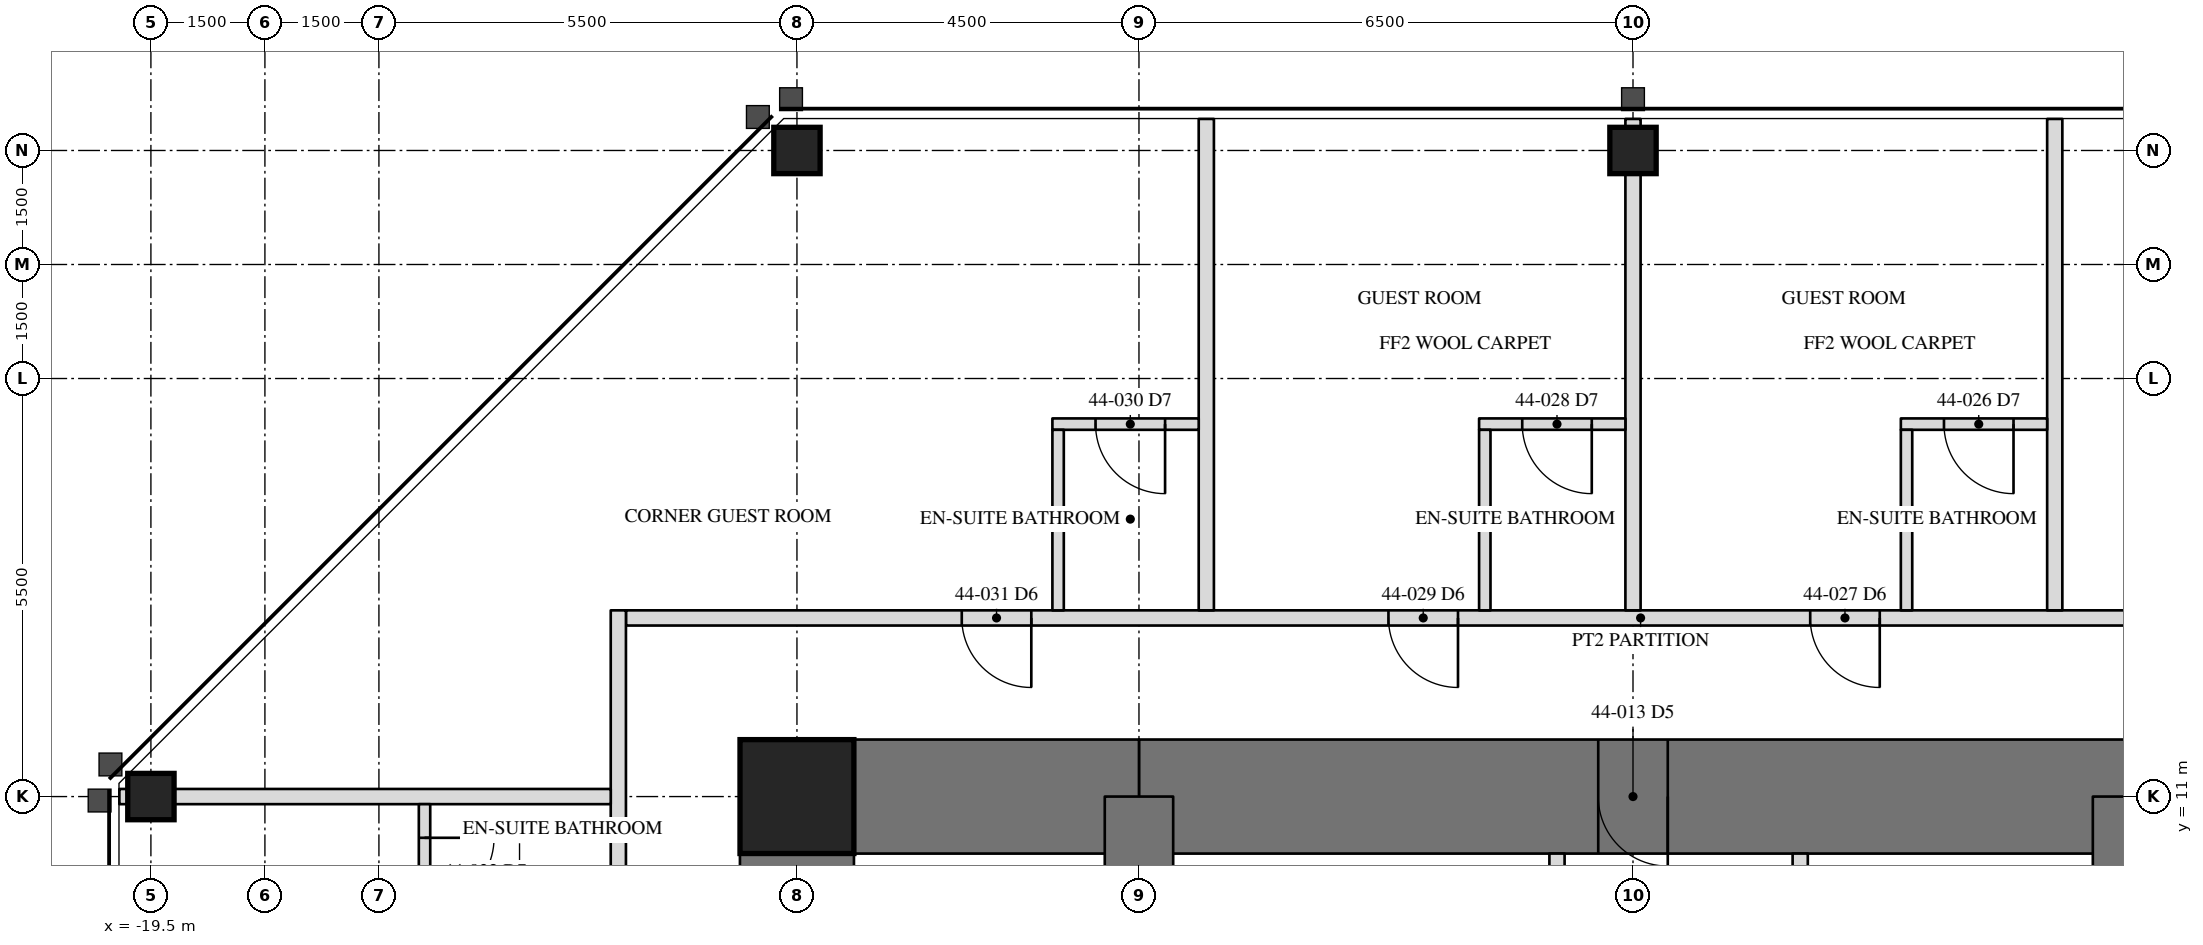
"""IFC4 building model, lengths in metres.
Left out: names, types, materials, properties, quantities, classifications, styles, units other than length and angle.
Written with IfcOpenShell. Run it as: python <this file> out.ifc"""

import sys

from ifc_helpers import new_model, si_unit, direction, frame, frame_2d, origin, origin_2d, place, context, subcontext, project, spatial, rectangle, hollow_rectangle, extrude, element, fill, save


model = new_model("IFC4")
c1 = context("Model", 3, precision=1e-05, world=origin(), true_north=direction((0.0, 1.0)))
c2 = subcontext(c1, "Body", "Model", "MODEL_VIEW")
j1 = project(units=[si_unit("LENGTHUNIT", "METRE"), si_unit("PLANEANGLEUNIT", "RADIAN")], contexts=[c1])
p1 = place(None, origin())
s1 = spatial("IfcSite", under=j1, at=p1, CompositionType="ELEMENT")
p2 = place(p1, origin())
s2 = spatial("IfcBuilding", under=s1, at=p2, CompositionType="ELEMENT")
p3 = place(p2, frame((0.0, 0.0, 190.7)))
s3 = spatial("IfcBuildingStorey", under=s2, at=p3, CompositionType="ELEMENT", Elevation=190.7)
for number, where, z_axis, x_axis in (
    (1, (0.0, 19.5, 0.0), (0.0, 0.0, 1.0), (1.0, 0.0, 0.0)),
    (2, (-11.0, 19.5, 0.0), (0.0, 0.0, 1.0), (1.0, 0.0, 0.0)),
    (3, (-19.5, 11.0, 0.0), (0.0, 0.0, 1.0), (0.0, 1.0, 0.0)),
):
    element("IfcColumn", number, at=place(p3, frame(where, z_axis=z_axis, x_axis=x_axis)), inside=s3, PredefinedType="COLUMN", context=c2, shape_type="SweptSolid", body=[
        extrude(hollow_rectangle(XDim=0.61, YDim=0.61, WallThickness=0.076, at=origin_2d()), origin(), (0.0, 0.0, 1.0), 3.5),
    ])
p4 = place(p3, frame((-11.0, 11.0, 0.0), z_axis=(0.0, 0.0, 1.0), x_axis=(0.0, -1.0, 0.0)))
e4 = element("IfcWall", 4, at=p4, inside=s3, PredefinedType="SHEAR", context=c2, shape_type="SweptSolid", body=[
    extrude(rectangle(XDim=22.0, YDim=1.5, at=frame_2d((11.0, 0.0))), origin(), (0.0, 0.0, 1.0), 3.5),
])
p5 = place(p4, frame((15.393, 0.0, 0.0)))
e5 = element("IfcOpeningElement", 5, at=p5, cuts=e4, PredefinedType="OPENING", context=c2, shape_type="SweptSolid", body=[
    extrude(rectangle(XDim=0.915, YDim=2.134, at=frame_2d((0.458, 1.067))), frame((0.0, 0.76, 0.0), z_axis=(0.0, -1.0, 0.0), x_axis=(1.0, 0.0, 0.0)), (0.0, 0.0, 1.0), 1.52),
])
p6 = place(p3, frame((6.5, 11.0, 0.0), z_axis=(0.0, 0.0, 1.0), x_axis=(-1.0, 0.0, 0.0)))
e6 = element("IfcWall", 6, at=p6, inside=s3, PredefinedType="SHEAR", context=c2, shape_type="SweptSolid", body=[
    extrude(rectangle(XDim=13.0, YDim=1.5, at=frame_2d((6.5, 0.0))), origin(), (0.0, 0.0, 1.0), 3.5),
])
p7 = place(p6, frame((6.042, 0.0, 0.0)))
e7 = element("IfcOpeningElement", 7, at=p7, cuts=e6, PredefinedType="OPENING", context=c2, shape_type="SweptSolid", body=[
    extrude(rectangle(XDim=0.915, YDim=2.134, at=frame_2d((0.458, 1.067))), frame((0.0, 0.76, 0.0), z_axis=(0.0, -1.0, 0.0), x_axis=(1.0, 0.0, 0.0)), (0.0, 0.0, 1.0), 1.52),
])
p8 = place(p3, frame((-6.5, 11.0, 0.0), z_axis=(0.0, 0.0, 1.0), x_axis=(-1.0, 0.0, 0.0)))
e8 = element("IfcWall", 8, at=p8, inside=s3, PredefinedType="SHEAR", context=c2, shape_type="SweptSolid", body=[
    extrude(rectangle(XDim=4.5, YDim=1.5, at=frame_2d((2.25, 0.0))), origin(), (0.0, 0.0, 1.0), 3.5),
])
for number, where, z_axis, x_axis in (
    (9, (6.5, 6.5, 0.0), (0.0, 0.0, 1.0), (0.0, 1.0, 0.0)),
    (10, (-6.5, 11.0, 0.0), (0.0, 0.0, 1.0), (0.0, -1.0, 0.0)),
):
    element("IfcWall", number, at=place(p3, frame(where, z_axis=z_axis, x_axis=x_axis)), inside=s3, PredefinedType="SHEAR", context=c2, shape_type="SweptSolid", body=[
        extrude(rectangle(XDim=4.5, YDim=0.9, at=frame_2d((2.25, 0.0))), origin(), (0.0, 0.0, 1.0), 3.5),
    ])
p9 = place(p3, frame((-11.0, 11.0, 0.0), z_axis=(0.0, 0.0, 1.0), x_axis=(1.0, 0.0, 0.0)))
e11 = element("IfcColumn", 11, at=p9, inside=s3, PredefinedType="COLUMN", context=c2, shape_type="SweptSolid", body=[
    extrude(hollow_rectangle(XDim=1.499, YDim=1.499, WallThickness=0.102, at=origin_2d()), origin(), (0.0, 0.0, 1.0), 3.5),
])
p10 = place(p3, frame((-1.0, 6.95, 0.0), z_axis=(0.0, 0.0, 1.0), x_axis=(0.0, 1.0, 0.0)))
e12 = element("IfcWall", 12, at=p10, inside=s3, PredefinedType="PARTITIONING", context=c2, shape_type="SweptSolid", body=[
    extrude(rectangle(XDim=3.3, YDim=0.2, at=frame_2d((1.65, 0.0))), origin(), (0.0, 0.0, 1.0), 3.31),
])
p11 = place(p10, frame((1.192, 0.0, 0.0)))
e13 = element("IfcOpeningElement", 13, at=p11, cuts=e12, PredefinedType="OPENING", context=c2, shape_type="SweptSolid", body=[
    extrude(rectangle(XDim=0.915, YDim=2.134, at=frame_2d((0.458, 1.067))), frame((0.0, 0.11, 0.0), z_axis=(0.0, -1.0, 0.0), x_axis=(1.0, 0.0, 0.0)), (0.0, 0.0, 1.0), 0.22),
])
p12 = place(p3, frame((2.2, 6.95, 0.0), z_axis=(0.0, 0.0, 1.0), x_axis=(0.0, 1.0, 0.0)))
e14 = element("IfcWall", 14, at=p12, inside=s3, PredefinedType="PARTITIONING", context=c2, shape_type="SweptSolid", body=[
    extrude(rectangle(XDim=3.3, YDim=0.2, at=frame_2d((1.65, 0.0))), origin(), (0.0, 0.0, 1.0), 3.31),
])
p13 = place(p12, frame((1.192, 0.0, 0.0)))
e15 = element("IfcOpeningElement", 15, at=p13, cuts=e14, PredefinedType="OPENING", context=c2, shape_type="SweptSolid", body=[
    extrude(rectangle(XDim=0.915, YDim=2.134, at=frame_2d((0.458, 1.067))), frame((0.0, 0.11, 0.0), z_axis=(0.0, -1.0, 0.0), x_axis=(1.0, 0.0, 0.0)), (0.0, 0.0, 1.0), 0.22),
])
p14 = place(p3, frame((13.45, 13.35, 0.0), z_axis=(0.0, 0.0, 1.0), x_axis=(-1.0, 0.0, 0.0)))
e16 = element("IfcWall", 16, at=p14, inside=s3, PredefinedType="PARTITIONING", context=c2, shape_type="SweptSolid", body=[
    extrude(rectangle(XDim=26.7, YDim=0.2, at=frame_2d((13.35, 0.0))), origin(), (0.0, 0.0, 1.0), 3.31),
])
p15 = place(p14, frame((4.752, 0.0, 0.0)))
e17 = element("IfcOpeningElement", 17, at=p15, cuts=e16, PredefinedType="OPENING", context=c2, shape_type="SweptSolid", body=[
    extrude(rectangle(XDim=0.915, YDim=2.134, at=frame_2d((0.458, 1.067))), frame((0.0, 0.11, 0.0), z_axis=(0.0, -1.0, 0.0), x_axis=(1.0, 0.0, 0.0)), (0.0, 0.0, 1.0), 0.22),
])
p16 = place(p14, frame((10.204, 0.0, 0.0)))
e18 = element("IfcOpeningElement", 18, at=p16, cuts=e16, PredefinedType="OPENING", context=c2, shape_type="SweptSolid", body=[
    extrude(rectangle(XDim=0.915, YDim=2.134, at=frame_2d((0.458, 1.067))), frame((0.0, 0.11, 0.0), z_axis=(0.0, -1.0, 0.0), x_axis=(1.0, 0.0, 0.0)), (0.0, 0.0, 1.0), 0.22),
])
p17 = place(p14, frame((15.752, 0.0, 0.0)))
e19 = element("IfcOpeningElement", 19, at=p17, cuts=e16, PredefinedType="OPENING", context=c2, shape_type="SweptSolid", body=[
    extrude(rectangle(XDim=0.915, YDim=2.134, at=frame_2d((0.458, 1.067))), frame((0.0, 0.11, 0.0), z_axis=(0.0, -1.0, 0.0), x_axis=(1.0, 0.0, 0.0)), (0.0, 0.0, 1.0), 0.22),
])
p18 = place(p14, frame((21.366, 0.0, 0.0)))
e20 = element("IfcOpeningElement", 20, at=p18, cuts=e16, PredefinedType="OPENING", context=c2, shape_type="SweptSolid", body=[
    extrude(rectangle(XDim=0.915, YDim=2.134, at=frame_2d((0.458, 1.067))), frame((0.0, 0.11, 0.0), z_axis=(0.0, -1.0, 0.0), x_axis=(1.0, 0.0, 0.0)), (0.0, 0.0, 1.0), 0.22),
])
p19 = place(p3, frame((-13.35, 13.45, 0.0), z_axis=(0.0, 0.0, 1.0), x_axis=(0.0, -1.0, 0.0)))
e21 = element("IfcWall", 21, at=p19, inside=s3, PredefinedType="PARTITIONING", context=c2, shape_type="SweptSolid", body=[
    extrude(rectangle(XDim=26.7, YDim=0.2, at=frame_2d((13.35, 0.0))), origin(), (0.0, 0.0, 1.0), 3.31),
])
p20 = place(p19, frame((4.752, 0.0, 0.0)))
e22 = element("IfcOpeningElement", 22, at=p20, cuts=e21, PredefinedType="OPENING", context=c2, shape_type="SweptSolid", body=[
    extrude(rectangle(XDim=0.915, YDim=2.134, at=frame_2d((0.458, 1.067))), frame((0.0, 0.11, 0.0), z_axis=(0.0, -1.0, 0.0), x_axis=(1.0, 0.0, 0.0)), (0.0, 0.0, 1.0), 0.22),
])
p21 = place(p19, frame((10.204, 0.0, 0.0)))
e23 = element("IfcOpeningElement", 23, at=p21, cuts=e21, PredefinedType="OPENING", context=c2, shape_type="SweptSolid", body=[
    extrude(rectangle(XDim=0.915, YDim=2.134, at=frame_2d((0.458, 1.067))), frame((0.0, 0.11, 0.0), z_axis=(0.0, -1.0, 0.0), x_axis=(1.0, 0.0, 0.0)), (0.0, 0.0, 1.0), 0.22),
])
p22 = place(p19, frame((15.752, 0.0, 0.0)))
e24 = element("IfcOpeningElement", 24, at=p22, cuts=e21, PredefinedType="OPENING", context=c2, shape_type="SweptSolid", body=[
    extrude(rectangle(XDim=0.915, YDim=2.134, at=frame_2d((0.458, 1.067))), frame((0.0, 0.11, 0.0), z_axis=(0.0, -1.0, 0.0), x_axis=(1.0, 0.0, 0.0)), (0.0, 0.0, 1.0), 0.22),
])
p23 = place(p19, frame((21.366, 0.0, 0.0)))
e25 = element("IfcOpeningElement", 25, at=p23, cuts=e21, PredefinedType="OPENING", context=c2, shape_type="SweptSolid", body=[
    extrude(rectangle(XDim=0.915, YDim=2.134, at=frame_2d((0.458, 1.067))), frame((0.0, 0.11, 0.0), z_axis=(0.0, -1.0, 0.0), x_axis=(1.0, 0.0, 0.0)), (0.0, 0.0, 1.0), 0.22),
])
p24 = place(p3, frame((5.549, 13.45, 0.0), z_axis=(0.0, 0.0, 1.0), x_axis=(0.0, 1.0, 0.0)))
e26 = element("IfcWall", 26, at=p24, inside=s3, PredefinedType="PARTITIONING", context=c2, shape_type="SweptSolid", body=[
    extrude(rectangle(XDim=6.465, YDim=0.2, at=frame_2d((3.232, 0.0))), origin(), (0.0, 0.0, 1.0), 3.31),
])
p25 = place(p3, frame((0.0, 13.45, 0.0), z_axis=(0.0, 0.0, 1.0), x_axis=(0.0, 1.0, 0.0)))
e27 = element("IfcWall", 27, at=p25, inside=s3, PredefinedType="PARTITIONING", context=c2, shape_type="SweptSolid", body=[
    extrude(rectangle(XDim=6.465, YDim=0.2, at=frame_2d((3.232, 0.0))), origin(), (0.0, 0.0, 1.0), 2.802),
])
p26 = place(p3, frame((-5.614, 13.45, 0.0), z_axis=(0.0, 0.0, 1.0), x_axis=(0.0, 1.0, 0.0)))
e28 = element("IfcWall", 28, at=p26, inside=s3, PredefinedType="PARTITIONING", context=c2, shape_type="SweptSolid", body=[
    extrude(rectangle(XDim=6.465, YDim=0.2, at=frame_2d((3.232, 0.0))), origin(), (0.0, 0.0, 1.0), 3.31),
])
p27 = place(p3, frame((5.449, 15.9, 0.0), z_axis=(0.0, 0.0, 1.0), x_axis=(-1.0, 0.0, 0.0)))
e29 = element("IfcWall", 29, at=p27, inside=s3, PredefinedType="PARTITIONING", context=c2, shape_type="SweptSolid", body=[
    extrude(rectangle(XDim=1.925, YDim=0.15, at=frame_2d((0.962, 0.0))), origin(), (0.0, 0.0, 1.0), 3.31),
])
p28 = place(p27, frame((0.442, 0.0, 0.0)))
e30 = element("IfcOpeningElement", 30, at=p28, cuts=e29, PredefinedType="OPENING", context=c2, shape_type="SweptSolid", body=[
    extrude(rectangle(XDim=0.915, YDim=2.032, at=frame_2d((0.458, 1.016))), frame((0.0, 0.085, 0.0), z_axis=(0.0, -1.0, 0.0), x_axis=(1.0, 0.0, 0.0)), (0.0, 0.0, 1.0), 0.17),
])
p29 = place(p3, frame((3.599, 13.45, 0.0), z_axis=(0.0, 0.0, 1.0), x_axis=(0.0, 1.0, 0.0)))
e31 = element("IfcWall", 31, at=p29, inside=s3, PredefinedType="PARTITIONING", context=c2, shape_type="SweptSolid", body=[
    extrude(rectangle(XDim=2.375, YDim=0.15, at=frame_2d((1.188, 0.0))), origin(), (0.0, 0.0, 1.0), 2.703),
])
p30 = place(p3, frame((-0.1, 15.9, 0.0), z_axis=(0.0, 0.0, 1.0), x_axis=(-1.0, 0.0, 0.0)))
e32 = element("IfcWall", 32, at=p30, inside=s3, PredefinedType="PARTITIONING", context=c2, shape_type="SweptSolid", body=[
    extrude(rectangle(XDim=1.925, YDim=0.15, at=frame_2d((0.962, 0.0))), origin(), (0.0, 0.0, 1.0), 3.31),
])
p31 = place(p30, frame((0.442, 0.0, 0.0)))
e33 = element("IfcOpeningElement", 33, at=p31, cuts=e32, PredefinedType="OPENING", context=c2, shape_type="SweptSolid", body=[
    extrude(rectangle(XDim=0.915, YDim=2.032, at=frame_2d((0.458, 1.016))), frame((0.0, 0.085, 0.0), z_axis=(0.0, -1.0, 0.0), x_axis=(1.0, 0.0, 0.0)), (0.0, 0.0, 1.0), 0.17),
])
p32 = place(p3, frame((-1.95, 13.45, 0.0), z_axis=(0.0, 0.0, 1.0), x_axis=(0.0, 1.0, 0.0)))
e34 = element("IfcWall", 34, at=p32, inside=s3, PredefinedType="PARTITIONING", context=c2, shape_type="SweptSolid", body=[
    extrude(rectangle(XDim=2.375, YDim=0.15, at=frame_2d((1.188, 0.0))), origin(), (0.0, 0.0, 1.0), 3.31),
])
p33 = place(p3, frame((-5.714, 15.9, 0.0), z_axis=(0.0, 0.0, 1.0), x_axis=(-1.0, 0.0, 0.0)))
e35 = element("IfcWall", 35, at=p33, inside=s3, PredefinedType="PARTITIONING", context=c2, shape_type="SweptSolid", body=[
    extrude(rectangle(XDim=1.925, YDim=0.15, at=frame_2d((0.962, 0.0))), origin(), (0.0, 0.0, 1.0), 3.31),
])
p34 = place(p33, frame((0.442, 0.0, 0.0)))
e36 = element("IfcOpeningElement", 36, at=p34, cuts=e35, PredefinedType="OPENING", context=c2, shape_type="SweptSolid", body=[
    extrude(rectangle(XDim=0.915, YDim=2.032, at=frame_2d((0.458, 1.016))), frame((0.0, 0.085, 0.0), z_axis=(0.0, -1.0, 0.0), x_axis=(1.0, 0.0, 0.0)), (0.0, 0.0, 1.0), 0.17),
])
p35 = place(p3, frame((-7.564, 13.45, 0.0), z_axis=(0.0, 0.0, 1.0), x_axis=(0.0, 1.0, 0.0)))
e37 = element("IfcWall", 37, at=p35, inside=s3, PredefinedType="PARTITIONING", context=c2, shape_type="SweptSolid", body=[
    extrude(rectangle(XDim=2.375, YDim=0.15, at=frame_2d((1.188, 0.0))), origin(), (0.0, 0.0, 1.0), 3.31),
])
p36 = place(p3, frame((-13.45, 11.0, 0.0), z_axis=(0.0, 0.0, 1.0), x_axis=(-1.0, 0.0, 0.0)))
e38 = element("IfcWall", 38, at=p36, inside=s3, PredefinedType="PARTITIONING", context=c2, shape_type="SweptSolid", body=[
    extrude(rectangle(XDim=6.465, YDim=0.2, at=frame_2d((3.232, 0.0))), origin(), (0.0, 0.0, 1.0), 2.802),
])
p37 = place(p3, frame((-15.9, 10.9, 0.0), z_axis=(0.0, 0.0, 1.0), x_axis=(0.0, -1.0, 0.0)))
e39 = element("IfcWall", 39, at=p37, inside=s3, PredefinedType="PARTITIONING", context=c2, shape_type="SweptSolid", body=[
    extrude(rectangle(XDim=1.925, YDim=0.15, at=frame_2d((0.962, 0.0))), origin(), (0.0, 0.0, 1.0), 3.31),
])
p38 = place(p37, frame((0.442, 0.0, 0.0)))
e40 = element("IfcOpeningElement", 40, at=p38, cuts=e39, PredefinedType="OPENING", context=c2, shape_type="SweptSolid", body=[
    extrude(rectangle(XDim=0.915, YDim=2.032, at=frame_2d((0.458, 1.016))), frame((0.0, 0.085, 0.0), z_axis=(0.0, -1.0, 0.0), x_axis=(1.0, 0.0, 0.0)), (0.0, 0.0, 1.0), 0.17),
])
p39 = place(p7, origin())
e41 = element("IfcDoor", 41, at=p39, inside=s3, OperationType="SINGLE_SWING_RIGHT", PredefinedType="DOOR", context=c2, shape_type="SweptSolid", body=[
    extrude(rectangle(XDim=0.915, YDim=2.134, at=frame_2d((0.458, 1.067))), frame((0.0, 0.025, 0.0), z_axis=(0.0, -1.0, 0.0), x_axis=(1.0, 0.0, 0.0)), (0.0, 0.0, 1.0), 0.05),
])
fill(e7, e41)
p40 = place(p28, origin())
e42 = element("IfcDoor", 42, at=p40, inside=s3, OperationType="SINGLE_SWING_LEFT", PredefinedType="DOOR", context=c2, shape_type="SweptSolid", body=[
    extrude(rectangle(XDim=0.915, YDim=2.032, at=frame_2d((0.458, 1.016))), frame((0.0, 0.025, 0.0), z_axis=(0.0, -1.0, 0.0), x_axis=(1.0, 0.0, 0.0)), (0.0, 0.0, 1.0), 0.05),
])
fill(e30, e42)
p41 = place(p16, origin())
e43 = element("IfcDoor", 43, at=p41, inside=s3, OperationType="SINGLE_SWING_LEFT", PredefinedType="DOOR", context=c2, shape_type="SweptSolid", body=[
    extrude(rectangle(XDim=0.915, YDim=2.134, at=frame_2d((0.458, 1.067))), frame((0.0, 0.025, 0.0), z_axis=(0.0, -1.0, 0.0), x_axis=(1.0, 0.0, 0.0)), (0.0, 0.0, 1.0), 0.05),
])
fill(e18, e43)
p42 = place(p31, origin())
e44 = element("IfcDoor", 44, at=p42, inside=s3, OperationType="SINGLE_SWING_LEFT", PredefinedType="DOOR", context=c2, shape_type="SweptSolid", body=[
    extrude(rectangle(XDim=0.915, YDim=2.032, at=frame_2d((0.458, 1.016))), frame((0.0, 0.025, 0.0), z_axis=(0.0, -1.0, 0.0), x_axis=(1.0, 0.0, 0.0)), (0.0, 0.0, 1.0), 0.05),
])
fill(e33, e44)
p43 = place(p17, origin())
e45 = element("IfcDoor", 45, at=p43, inside=s3, OperationType="SINGLE_SWING_LEFT", PredefinedType="DOOR", context=c2, shape_type="SweptSolid", body=[
    extrude(rectangle(XDim=0.915, YDim=2.134, at=frame_2d((0.458, 1.067))), frame((0.0, 0.025, 0.0), z_axis=(0.0, -1.0, 0.0), x_axis=(1.0, 0.0, 0.0)), (0.0, 0.0, 1.0), 0.05),
])
fill(e19, e45)
p44 = place(p34, origin())
e46 = element("IfcDoor", 46, at=p44, inside=s3, OperationType="SINGLE_SWING_LEFT", PredefinedType="DOOR", context=c2, shape_type="SweptSolid", body=[
    extrude(rectangle(XDim=0.915, YDim=2.032, at=frame_2d((0.458, 1.016))), frame((0.0, 0.025, 0.0), z_axis=(0.0, -1.0, 0.0), x_axis=(1.0, 0.0, 0.0)), (0.0, 0.0, 1.0), 0.05),
])
fill(e36, e46)
p45 = place(p18, origin())
e47 = element("IfcDoor", 47, at=p45, inside=s3, OperationType="SINGLE_SWING_LEFT", PredefinedType="DOOR", context=c2, shape_type="SweptSolid", body=[
    extrude(rectangle(XDim=0.915, YDim=2.134, at=frame_2d((0.458, 1.067))), frame((0.0, 0.025, 0.0), z_axis=(0.0, -1.0, 0.0), x_axis=(1.0, 0.0, 0.0)), (0.0, 0.0, 1.0), 0.05),
])
fill(e20, e47)
p46 = place(p38, origin())
e48 = element("IfcDoor", 48, at=p46, inside=s3, OperationType="SINGLE_SWING_LEFT", PredefinedType="DOOR", context=c2, shape_type="SweptSolid", body=[
    extrude(rectangle(XDim=0.915, YDim=2.032, at=frame_2d((0.458, 1.016))), frame((0.0, 0.025, 0.0), z_axis=(0.0, -1.0, 0.0), x_axis=(1.0, 0.0, 0.0)), (0.0, 0.0, 1.0), 0.05),
])
fill(e40, e48)
save(model, sys.argv[1])
